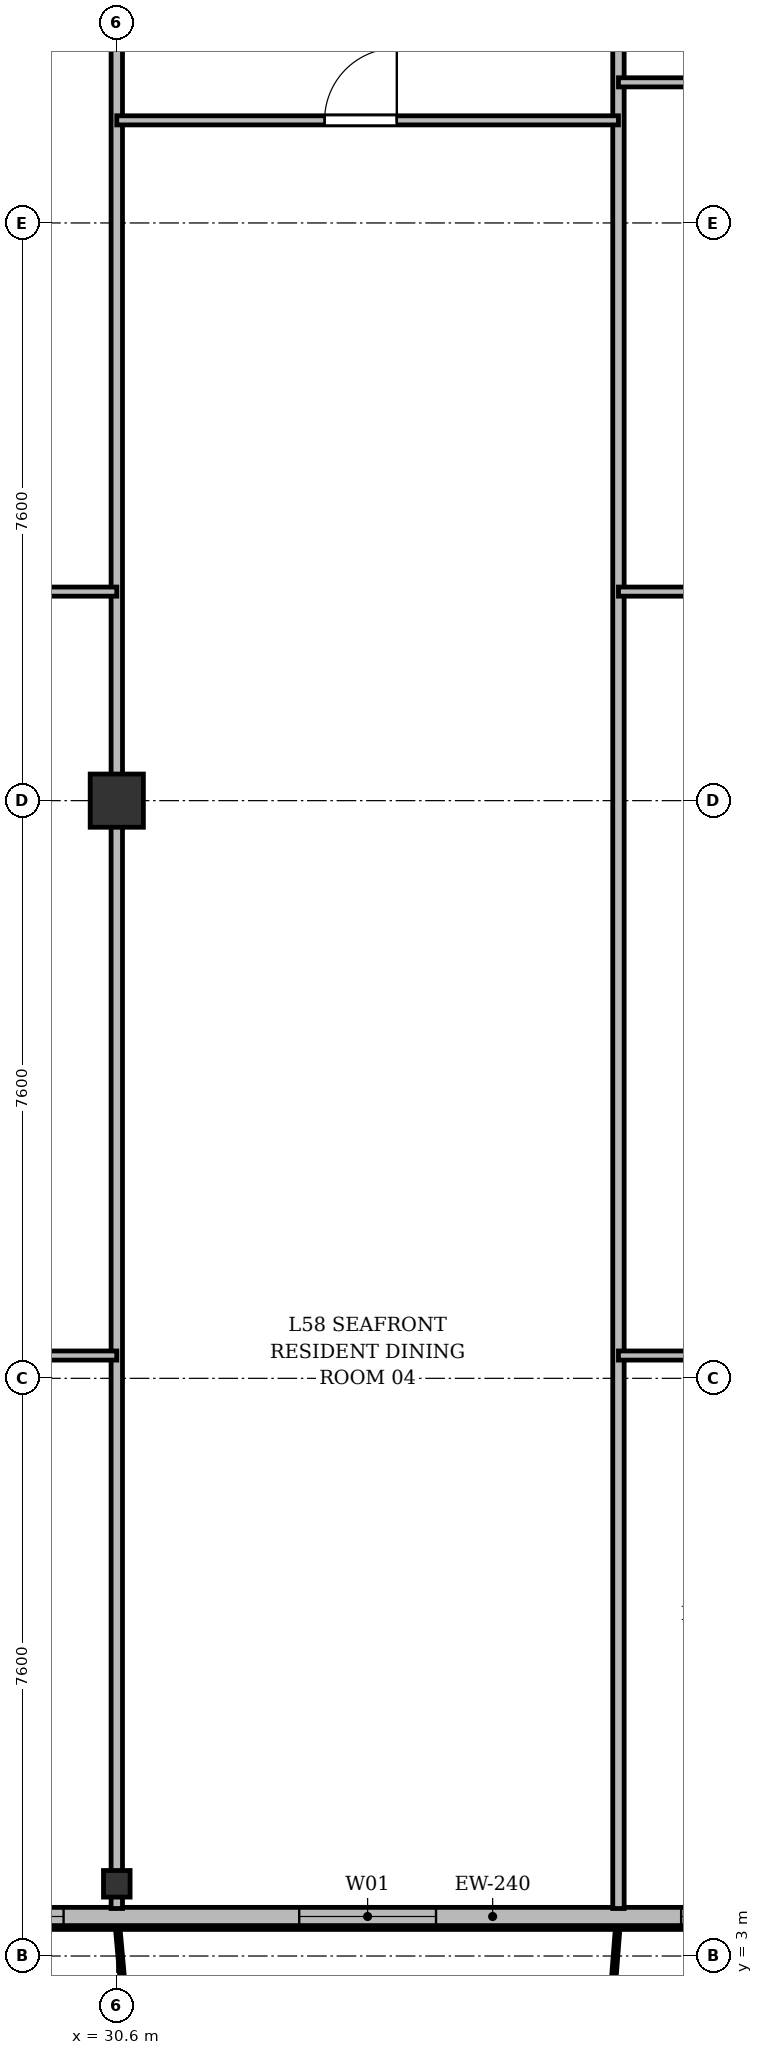
"""IFC4 building model, lengths in metres.
Left out: names, types, materials, properties, quantities, classifications, styles, units other than length and angle.
Written with IfcOpenShell. Run it as: python <this file> out.ifc"""

import sys

from ifc_helpers import new_model, si_unit, direction, frame, frame_2d, origin, origin_2d, place, context, subcontext, project, spatial, rectangle, i_section, extrude, source, transform, mapped, element, fill, save


model = new_model("IFC4")
c1 = context("Model", 3, precision=1e-05, world=origin(), true_north=direction((0.0, 1.0)))
c2 = subcontext(c1, "Body", "Model", "MODEL_VIEW")
j1 = project(units=[si_unit("LENGTHUNIT", "METRE"), si_unit("PLANEANGLEUNIT", "RADIAN")], contexts=[c1])
p1 = place(None, origin())
s1 = spatial("IfcSite", under=j1, at=p1, CompositionType="ELEMENT")
p2 = place(p1, origin())
s2 = spatial("IfcBuilding", under=s1, at=p2, CompositionType="ELEMENT")
p3 = place(p2, frame((0.0, 0.0, 222.9)))
s3 = spatial("IfcBuildingStorey", under=s2, at=p3, CompositionType="ELEMENT", Elevation=222.9)
m1 = source(origin(), c2, "Body", "SweptSolid", [
    extrude(i_section(OverallWidth=0.35, OverallDepth=0.35, WebThickness=0.018, FlangeThickness=0.028, at=origin_2d()), origin(), (0.0, 0.0, 1.0), 3.6),
])
p4 = place(p3, frame((30.6, 3.95, 0.0), z_axis=(0.0, 0.0, 1.0), x_axis=(1.0, 0.0, 0.0)))
e1 = element("IfcColumn", 1, at=p4, inside=s3, PredefinedType="COLUMN", context=c2, shape_type="MappedRepresentation", body=[
    mapped(m1, transform((0.0, 0.0, 0.0), x_axis=(1.0, 0.0, 0.0), y_axis=(0.0, 1.0, 0.0), z_axis=(0.0, 0.0, 1.0), scale=1.0)),
])
m2 = source(origin(), c2, "Body", "SweptSolid", [
    extrude(rectangle(XDim=0.7, YDim=0.7, at=origin_2d()), origin(), (0.0, 0.0, 1.0), 3.6),
])
p5 = place(p3, frame((30.6, 18.2, 0.0), z_axis=(0.0, 0.0, 1.0), x_axis=(1.0, 0.0, 0.0)))
e2 = element("IfcColumn", 2, at=p5, inside=s3, PredefinedType="COLUMN", context=c2, shape_type="MappedRepresentation", body=[
    mapped(m2, transform((0.0, 0.0, 0.0), x_axis=(1.0, 0.0, 0.0), y_axis=(0.0, 1.0, 0.0), z_axis=(0.0, 0.0, 1.0), scale=1.0)),
])
p6 = place(p3, frame((63.4, 3.52, 0.0), z_axis=(0.0, 0.0, 1.0), x_axis=(-1.0, 0.0, 0.0)))
e3 = element("IfcWall", 3, at=p6, inside=s3, PredefinedType="SOLIDWALL", context=c2, shape_type="SweptSolid", body=[
    extrude(rectangle(XDim=52.4, YDim=0.24, at=frame_2d((26.2, 0.0))), origin(), (0.0, 0.0, 1.0), 3.36),
])
p7 = place(p6, frame((1.345, 0.0, 0.9)))
e4 = element("IfcOpeningElement", 4, at=p7, cuts=e3, PredefinedType="OPENING", context=c2, shape_type="SweptSolid", body=[
    extrude(rectangle(XDim=2.0, YDim=1.95, at=frame_2d((1.0, 0.975))), frame((0.0, 0.13, 0.0), z_axis=(0.0, -1.0, 0.0), x_axis=(1.0, 0.0, 0.0)), (0.0, 0.0, 1.0), 0.26),
])
p8 = place(p6, frame((7.675, 0.0, 0.9)))
e5 = element("IfcOpeningElement", 5, at=p8, cuts=e3, PredefinedType="OPENING", context=c2, shape_type="SweptSolid", body=[
    extrude(rectangle(XDim=1.65, YDim=1.85, at=frame_2d((0.825, 0.925))), frame((0.0, 0.13, 0.0), z_axis=(0.0, -1.0, 0.0), x_axis=(1.0, 0.0, 0.0)), (0.0, 0.0, 1.0), 0.26),
])
p9 = place(p6, frame((13.42, 0.0, 0.0)))
e6 = element("IfcOpeningElement", 6, at=p9, cuts=e3, PredefinedType="OPENING", context=c2, shape_type="SweptSolid", body=[
    extrude(rectangle(XDim=1.2, YDim=2.2, at=frame_2d((0.6, 1.1))), frame((0.0, 0.13, 0.0), z_axis=(0.0, -1.0, 0.0), x_axis=(1.0, 0.0, 0.0)), (0.0, 0.0, 1.0), 0.26),
])
p10 = place(p6, frame((15.25, 0.0, 0.9)))
e7 = element("IfcOpeningElement", 7, at=p10, cuts=e3, PredefinedType="OPENING", context=c2, shape_type="SweptSolid", body=[
    extrude(rectangle(XDim=1.5, YDim=1.75, at=frame_2d((0.75, 0.875))), frame((0.0, 0.13, 0.0), z_axis=(0.0, -1.0, 0.0), x_axis=(1.0, 0.0, 0.0)), (0.0, 0.0, 1.0), 0.26),
])
p11 = place(p6, frame((17.65, 0.0, 0.9)))
e8 = element("IfcOpeningElement", 8, at=p11, cuts=e3, PredefinedType="OPENING", context=c2, shape_type="SweptSolid", body=[
    extrude(rectangle(XDim=1.5, YDim=1.75, at=frame_2d((0.75, 0.875))), frame((0.0, 0.13, 0.0), z_axis=(0.0, -1.0, 0.0), x_axis=(1.0, 0.0, 0.0)), (0.0, 0.0, 1.0), 0.26),
])
p12 = place(p6, frame((20.25, 0.0, 0.9)))
e9 = element("IfcOpeningElement", 9, at=p12, cuts=e3, PredefinedType="OPENING", context=c2, shape_type="SweptSolid", body=[
    extrude(rectangle(XDim=2.0, YDim=1.95, at=frame_2d((1.0, 0.975))), frame((0.0, 0.13, 0.0), z_axis=(0.0, -1.0, 0.0), x_axis=(1.0, 0.0, 0.0)), (0.0, 0.0, 1.0), 0.26),
])
p13 = place(p6, frame((23.725, 0.0, 0.9)))
e10 = element("IfcOpeningElement", 10, at=p13, cuts=e3, PredefinedType="OPENING", context=c2, shape_type="SweptSolid", body=[
    extrude(rectangle(XDim=1.65, YDim=1.85, at=frame_2d((0.825, 0.925))), frame((0.0, 0.13, 0.0), z_axis=(0.0, -1.0, 0.0), x_axis=(1.0, 0.0, 0.0)), (0.0, 0.0, 1.0), 0.26),
])
p14 = place(p6, frame((28.6, 0.0, 0.9)))
e11 = element("IfcOpeningElement", 11, at=p14, cuts=e3, PredefinedType="OPENING", context=c2, shape_type="SweptSolid", body=[
    extrude(rectangle(XDim=1.8, YDim=1.8, at=frame_2d((0.9, 0.9))), frame((0.0, 0.13, 0.0), z_axis=(0.0, -1.0, 0.0), x_axis=(1.0, 0.0, 0.0)), (0.0, 0.0, 1.0), 0.26),
])
p15 = place(p6, frame((33.5, 0.0, 0.9)))
e12 = element("IfcOpeningElement", 12, at=p15, cuts=e3, PredefinedType="OPENING", context=c2, shape_type="SweptSolid", body=[
    extrude(rectangle(XDim=2.2, YDim=1.8, at=frame_2d((1.1, 0.9))), frame((0.0, 0.13, 0.0), z_axis=(0.0, -1.0, 0.0), x_axis=(1.0, 0.0, 0.0)), (0.0, 0.0, 1.0), 0.26),
])
p16 = place(p6, frame((37.45, 0.0, 0.9)))
e13 = element("IfcOpeningElement", 13, at=p16, cuts=e3, PredefinedType="OPENING", context=c2, shape_type="SweptSolid", body=[
    extrude(rectangle(XDim=1.5, YDim=1.75, at=frame_2d((0.75, 0.875))), frame((0.0, 0.13, 0.0), z_axis=(0.0, -1.0, 0.0), x_axis=(1.0, 0.0, 0.0)), (0.0, 0.0, 1.0), 0.26),
])
p17 = place(p6, frame((41.09, 0.0, 0.0)))
e14 = element("IfcOpeningElement", 14, at=p17, cuts=e3, PredefinedType="OPENING", context=c2, shape_type="SweptSolid", body=[
    extrude(rectangle(XDim=1.2, YDim=2.2, at=frame_2d((0.6, 1.1))), frame((0.0, 0.13, 0.0), z_axis=(0.0, -1.0, 0.0), x_axis=(1.0, 0.0, 0.0)), (0.0, 0.0, 1.0), 0.26),
])
p18 = place(p6, frame((43.075, 0.0, 0.9)))
e15 = element("IfcOpeningElement", 15, at=p18, cuts=e3, PredefinedType="OPENING", context=c2, shape_type="SweptSolid", body=[
    extrude(rectangle(XDim=1.65, YDim=1.85, at=frame_2d((0.825, 0.925))), frame((0.0, 0.13, 0.0), z_axis=(0.0, -1.0, 0.0), x_axis=(1.0, 0.0, 0.0)), (0.0, 0.0, 1.0), 0.26),
])
p19 = place(p6, frame((45.6, 0.0, 0.9)))
e16 = element("IfcOpeningElement", 16, at=p19, cuts=e3, PredefinedType="OPENING", context=c2, shape_type="SweptSolid", body=[
    extrude(rectangle(XDim=1.8, YDim=1.8, at=frame_2d((0.9, 0.9))), frame((0.0, 0.13, 0.0), z_axis=(0.0, -1.0, 0.0), x_axis=(1.0, 0.0, 0.0)), (0.0, 0.0, 1.0), 0.26),
])
p20 = place(p6, frame((48.955, 0.0, 0.9)))
e17 = element("IfcOpeningElement", 17, at=p20, cuts=e3, PredefinedType="OPENING", context=c2, shape_type="SweptSolid", body=[
    extrude(rectangle(XDim=2.2, YDim=1.8, at=frame_2d((1.1, 0.9))), frame((0.0, 0.13, 0.0), z_axis=(0.0, -1.0, 0.0), x_axis=(1.0, 0.0, 0.0)), (0.0, 0.0, 1.0), 0.26),
])
p21 = place(p3, frame((30.6, 3.625, 0.0), z_axis=(0.0, 0.0, 1.0), x_axis=(0.0, 1.0, 0.0)))
e18 = element("IfcWall", 18, at=p21, inside=s3, PredefinedType="PARTITIONING", context=c2, shape_type="SweptSolid", body=[
    extrude(rectangle(XDim=27.375, YDim=0.15, at=frame_2d((13.688, 0.0))), origin(), (0.0, 0.0, 1.0), 2.86),
])
p22 = place(p3, frame((37.2, 3.625, 0.0), z_axis=(0.0, 0.0, 1.0), x_axis=(0.0, 1.0, 0.0)))
e19 = element("IfcWall", 19, at=p22, inside=s3, PredefinedType="PARTITIONING", context=c2, shape_type="SweptSolid", body=[
    extrude(rectangle(XDim=27.375, YDim=0.15, at=frame_2d((13.688, 0.0))), origin(), (0.0, 0.0, 1.0), 2.91),
])
p23 = place(p3, frame((23.4, 20.95, 0.0), z_axis=(0.0, 0.0, 1.0), x_axis=(1.0, 0.0, 0.0)))
e20 = element("IfcWall", 20, at=p23, inside=s3, PredefinedType="PARTITIONING", context=c2, shape_type="SweptSolid", body=[
    extrude(rectangle(XDim=7.2, YDim=0.12, at=frame_2d((3.6, 0.0))), origin(), (0.0, 0.0, 1.0), 2.86),
])
p24 = place(p23, frame((3.125, 0.0, 0.0)))
e21 = element("IfcOpeningElement", 21, at=p24, cuts=e20, PredefinedType="OPENING", context=c2, shape_type="SweptSolid", body=[
    extrude(rectangle(XDim=0.95, YDim=2.15, at=frame_2d((0.475, 1.075))), frame((0.0, 0.07, 0.0), z_axis=(0.0, -1.0, 0.0), x_axis=(1.0, 0.0, 0.0)), (0.0, 0.0, 1.0), 0.14),
])
p25 = place(p3, frame((27.0, 10.9, 0.0), z_axis=(0.0, 0.0, 1.0), x_axis=(1.0, 0.0, 0.0)))
e22 = element("IfcWall", 22, at=p25, inside=s3, PredefinedType="PARTITIONING", context=c2, shape_type="SweptSolid", body=[
    extrude(rectangle(XDim=3.6, YDim=0.12, at=frame_2d((1.8, 0.0))), origin(), (0.0, 0.0, 1.0), 2.86),
])
p26 = place(p25, frame((1.325, 0.0, 0.0)))
e23 = element("IfcOpeningElement", 23, at=p26, cuts=e22, PredefinedType="OPENING", context=c2, shape_type="SweptSolid", body=[
    extrude(rectangle(XDim=0.95, YDim=2.15, at=frame_2d((0.475, 1.075))), frame((0.0, 0.07, 0.0), z_axis=(0.0, -1.0, 0.0), x_axis=(1.0, 0.0, 0.0)), (0.0, 0.0, 1.0), 0.14),
])
p27 = place(p3, frame((30.6, 27.15, 0.0), z_axis=(0.0, 0.0, 1.0), x_axis=(1.0, 0.0, 0.0)))
e24 = element("IfcWall", 24, at=p27, inside=s3, PredefinedType="PARTITIONING", context=c2, shape_type="SweptSolid", body=[
    extrude(rectangle(XDim=6.6, YDim=0.12, at=frame_2d((3.3, 0.0))), origin(), (0.0, 0.0, 1.0), 2.86),
])
p28 = place(p27, frame((2.734, 0.0, 0.0)))
e25 = element("IfcOpeningElement", 25, at=p28, cuts=e24, PredefinedType="OPENING", context=c2, shape_type="SweptSolid", body=[
    extrude(rectangle(XDim=0.95, YDim=2.15, at=frame_2d((0.475, 1.075))), frame((0.0, 0.07, 0.0), z_axis=(0.0, -1.0, 0.0), x_axis=(1.0, 0.0, 0.0)), (0.0, 0.0, 1.0), 0.14),
])
p29 = place(p3, frame((37.2, 20.95, 0.0), z_axis=(0.0, 0.0, 1.0), x_axis=(1.0, 0.0, 0.0)))
e26 = element("IfcWall", 26, at=p29, inside=s3, PredefinedType="PARTITIONING", context=c2, shape_type="SweptSolid", body=[
    extrude(rectangle(XDim=6.6, YDim=0.12, at=frame_2d((3.3, 0.0))), origin(), (0.0, 0.0, 1.0), 2.86),
])
p30 = place(p29, frame((2.734, 0.0, 0.0)))
e27 = element("IfcOpeningElement", 27, at=p30, cuts=e26, PredefinedType="OPENING", context=c2, shape_type="SweptSolid", body=[
    extrude(rectangle(XDim=0.95, YDim=2.15, at=frame_2d((0.475, 1.075))), frame((0.0, 0.07, 0.0), z_axis=(0.0, -1.0, 0.0), x_axis=(1.0, 0.0, 0.0)), (0.0, 0.0, 1.0), 0.14),
])
p31 = place(p3, frame((37.2, 27.65, 0.0), z_axis=(0.0, 0.0, 1.0), x_axis=(1.0, 0.0, 0.0)))
e28 = element("IfcWall", 28, at=p31, inside=s3, PredefinedType="PARTITIONING", context=c2, shape_type="SweptSolid", body=[
    extrude(rectangle(XDim=2.294, YDim=0.12, at=frame_2d((1.147, 0.0))), origin(), (0.0, 0.0, 1.0), 3.36),
])
p32 = place(p3, frame((37.2, 10.9, 0.0), z_axis=(0.0, 0.0, 1.0), x_axis=(1.0, 0.0, 0.0)))
e29 = element("IfcWall", 29, at=p32, inside=s3, PredefinedType="PARTITIONING", context=c2, shape_type="SweptSolid", body=[
    extrude(rectangle(XDim=3.3, YDim=0.12, at=frame_2d((1.65, 0.0))), origin(), (0.0, 0.0, 1.0), 3.06),
])
p33 = place(p32, frame((1.175, 0.0, 0.0)))
e30 = element("IfcOpeningElement", 30, at=p33, cuts=e29, PredefinedType="OPENING", context=c2, shape_type="SweptSolid", body=[
    extrude(rectangle(XDim=0.95, YDim=2.15, at=frame_2d((0.475, 1.075))), frame((0.0, 0.07, 0.0), z_axis=(0.0, -1.0, 0.0), x_axis=(1.0, 0.0, 0.0)), (0.0, 0.0, 1.0), 0.14),
])
m3 = source(origin(), c2, "Body", "SweptSolid", [
    extrude(rectangle(XDim=1.65, YDim=1.85, at=frame_2d((0.825, 0.925))), frame((0.0, 0.03, 0.0), z_axis=(0.0, -1.0, 0.0), x_axis=(1.0, 0.0, 0.0)), (0.0, 0.0, 1.0), 0.06),
])
p34 = place(p13, origin())
e31 = element("IfcWindow", 31, at=p34, inside=s3, PartitioningType="SINGLE_PANEL", PredefinedType="WINDOW", context=c2, shape_type="MappedRepresentation", body=[
    mapped(m3, transform((0.0, 0.0, 0.0), x_axis=(1.0, 0.0, 0.0), y_axis=(0.0, 1.0, 0.0), z_axis=(0.0, 0.0, 1.0), scale=1.0)),
])
fill(e10, e31)
m4 = source(origin(), c2, "Body", "SweptSolid", [
    extrude(rectangle(XDim=1.8, YDim=1.8, at=frame_2d((0.9, 0.9))), frame((0.0, 0.03, 0.0), z_axis=(0.0, -1.0, 0.0), x_axis=(1.0, 0.0, 0.0)), (0.0, 0.0, 1.0), 0.06),
])
p35 = place(p14, origin())
e32 = element("IfcWindow", 32, at=p35, inside=s3, PartitioningType="SINGLE_PANEL", PredefinedType="WINDOW", context=c2, shape_type="MappedRepresentation", body=[
    mapped(m4, transform((0.0, 0.0, 0.0), x_axis=(1.0, 0.0, 0.0), y_axis=(0.0, 1.0, 0.0), z_axis=(0.0, 0.0, 1.0), scale=1.0)),
])
fill(e11, e32)
m5 = source(origin(), c2, "Body", "SweptSolid", [
    extrude(rectangle(XDim=2.2, YDim=1.8, at=frame_2d((1.1, 0.9))), frame((0.0, 0.03, 0.0), z_axis=(0.0, -1.0, 0.0), x_axis=(1.0, 0.0, 0.0)), (0.0, 0.0, 1.0), 0.06),
])
p36 = place(p15, origin())
e33 = element("IfcWindow", 33, at=p36, inside=s3, PartitioningType="SINGLE_PANEL", PredefinedType="WINDOW", context=c2, shape_type="MappedRepresentation", body=[
    mapped(m5, transform((0.0, 0.0, 0.0), x_axis=(1.0, 0.0, 0.0), y_axis=(0.0, 1.0, 0.0), z_axis=(0.0, 0.0, 1.0), scale=1.0)),
])
fill(e12, e33)
m6 = source(origin(), c2, "Body", "SweptSolid", [
    extrude(rectangle(XDim=0.95, YDim=2.15, at=frame_2d((0.475, 1.075))), frame((0.0, 0.025, 0.0), z_axis=(0.0, -1.0, 0.0), x_axis=(1.0, 0.0, 0.0)), (0.0, 0.0, 1.0), 0.05),
])
p37 = place(p28, origin())
e34 = element("IfcDoor", 34, at=p37, inside=s3, OperationType="SINGLE_SWING_RIGHT", PredefinedType="DOOR", context=c2, shape_type="MappedRepresentation", body=[
    mapped(m6, transform((0.0, 0.0, 0.0), x_axis=(1.0, 0.0, 0.0), y_axis=(0.0, 1.0, 0.0), z_axis=(0.0, 0.0, 1.0), scale=1.0)),
])
fill(e25, e34)
save(model, sys.argv[1])
